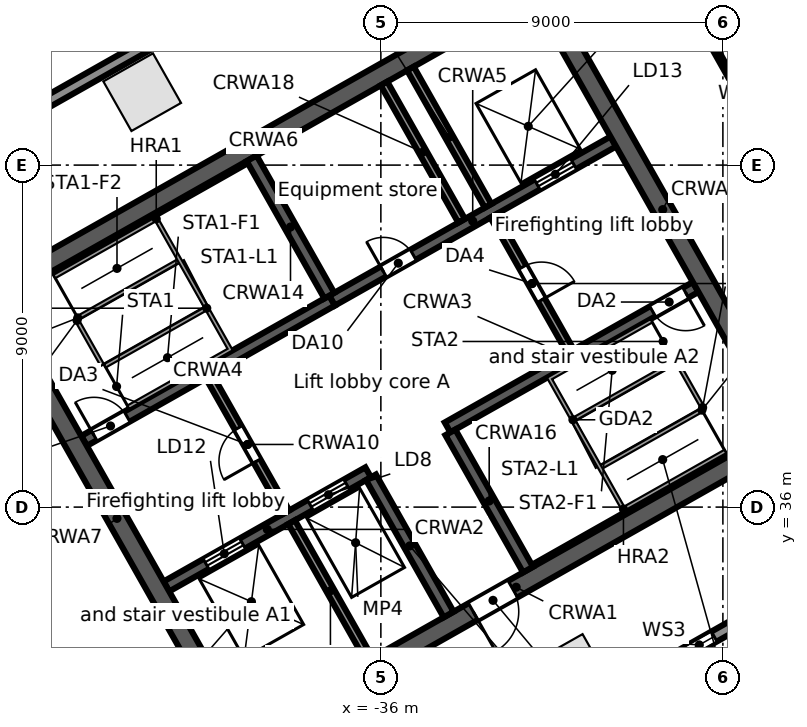
"""IFC4 building model, lengths in metres.
Left out: names, types, materials, properties, quantities, classifications, styles, units other than length and angle.
Written with IfcOpenShell. Run it as: python <this file> out.ifc"""

import sys

from ifc_helpers import new_model, si_unit, direction, frame, frame_2d, origin, origin_2d, place, context, subcontext, project, spatial, rectangle, extrude, element, fill, save


model = new_model("IFC4")
c1 = context("Model", 3, precision=1e-05, world=origin(), true_north=direction((0.0, 1.0)))
c2 = subcontext(c1, "Body", "Model", "MODEL_VIEW")
j1 = project(units=[si_unit("LENGTHUNIT", "METRE"), si_unit("PLANEANGLEUNIT", "RADIAN")], contexts=[c1])
p1 = place(None, origin())
s1 = spatial("IfcSite", under=j1, at=p1, CompositionType="ELEMENT")
p2 = place(p1, origin())
s2 = spatial("IfcBuilding", under=s1, at=p2, CompositionType="ELEMENT")
p3 = place(p2, frame((0.0, 0.0, 162.9)))
s3 = spatial("IfcBuildingStorey", under=s2, at=p3, CompositionType="ELEMENT", Elevation=162.9)
for number, where, z_axis, x_axis in (
    (1, (-42.28, 46.919, 0.0), (0.0, 0.0, 1.0), (-0.87, -0.492, 0.0)),
    (2, (-30.976, 31.635, 0.0), (0.0, 0.0, 1.0), (0.87, 0.492, 0.0)),
):
    element("IfcColumn", number, at=place(p3, frame(where, z_axis=z_axis, x_axis=x_axis)), inside=s3, PredefinedType="COLUMN", context=c2, shape_type="SweptSolid", body=[
        extrude(rectangle(XDim=1.5, YDim=1.5, at=origin_2d()), origin(), (0.0, 0.0, 1.0), 4.0),
    ])
p4 = place(p3, frame((-0.055, 47.969, 0.0), z_axis=(0.0, 0.0, 1.0), x_axis=(-0.870355730478, -0.492423499058, 0.0)))
e3 = element("IfcWall", 3, at=p4, inside=s3, PredefinedType="STANDARD", context=c2, shape_type="SweptSolid", body=[
    extrude(rectangle(XDim=43.75, YDim=0.3, at=frame_2d((21.875, 0.0))), origin(), (0.0, 0.0, 1.0), 3.68),
])
p5 = place(p4, frame((39.977, 0.0, 0.6)))
e4 = element("IfcOpeningElement", 4, at=p5, cuts=e3, PredefinedType="OPENING", context=c2, shape_type="SweptSolid", body=[
    extrude(rectangle(XDim=0.9, YDim=2.4, at=frame_2d((0.45, 1.2))), frame((0.0, 0.16, 0.0), z_axis=(0.0, -1.0, 0.0), x_axis=(1.0, 0.0, 0.0)), (0.0, 0.0, 1.0), 0.32),
])
p6 = place(p4, frame((37.338, 0.0, 0.0)))
e5 = element("IfcOpeningElement", 5, at=p6, cuts=e3, PredefinedType="OPENING", context=c2, shape_type="SweptSolid", body=[
    extrude(rectangle(XDim=1.8, YDim=2.4, at=frame_2d((0.9, 1.2))), frame((0.0, 0.16, 0.0), z_axis=(0.0, -1.0, 0.0), x_axis=(1.0, 0.0, 0.0)), (0.0, 0.0, 1.0), 0.32),
])
p7 = place(p4, frame((31.222, 0.0, 0.6)))
e6 = element("IfcOpeningElement", 6, at=p7, cuts=e3, PredefinedType="OPENING", context=c2, shape_type="SweptSolid", body=[
    extrude(rectangle(XDim=0.9, YDim=2.4, at=frame_2d((0.45, 1.2))), frame((0.0, 0.16, 0.0), z_axis=(0.0, -1.0, 0.0), x_axis=(1.0, 0.0, 0.0)), (0.0, 0.0, 1.0), 0.32),
])
p8 = place(p4, frame((28.584, 0.0, 0.0)))
e7 = element("IfcOpeningElement", 7, at=p8, cuts=e3, PredefinedType="OPENING", context=c2, shape_type="SweptSolid", body=[
    extrude(rectangle(XDim=1.8, YDim=2.4, at=frame_2d((0.9, 1.2))), frame((0.0, 0.16, 0.0), z_axis=(0.0, -1.0, 0.0), x_axis=(1.0, 0.0, 0.0)), (0.0, 0.0, 1.0), 0.32),
])
p9 = place(p4, frame((22.468, 0.0, 0.6)))
e8 = element("IfcOpeningElement", 8, at=p9, cuts=e3, PredefinedType="OPENING", context=c2, shape_type="SweptSolid", body=[
    extrude(rectangle(XDim=0.9, YDim=2.4, at=frame_2d((0.45, 1.2))), frame((0.0, 0.16, 0.0), z_axis=(0.0, -1.0, 0.0), x_axis=(1.0, 0.0, 0.0)), (0.0, 0.0, 1.0), 0.32),
])
p10 = place(p4, frame((19.829, 0.0, 0.0)))
e9 = element("IfcOpeningElement", 9, at=p10, cuts=e3, PredefinedType="OPENING", context=c2, shape_type="SweptSolid", body=[
    extrude(rectangle(XDim=1.8, YDim=2.4, at=frame_2d((0.9, 1.2))), frame((0.0, 0.16, 0.0), z_axis=(0.0, -1.0, 0.0), x_axis=(1.0, 0.0, 0.0)), (0.0, 0.0, 1.0), 0.32),
])
p11 = place(p4, frame((13.713, 0.0, 0.6)))
e10 = element("IfcOpeningElement", 10, at=p11, cuts=e3, PredefinedType="OPENING", context=c2, shape_type="SweptSolid", body=[
    extrude(rectangle(XDim=0.9, YDim=2.4, at=frame_2d((0.45, 1.2))), frame((0.0, 0.16, 0.0), z_axis=(0.0, -1.0, 0.0), x_axis=(1.0, 0.0, 0.0)), (0.0, 0.0, 1.0), 0.32),
])
p12 = place(p4, frame((11.075, 0.0, 0.0)))
e11 = element("IfcOpeningElement", 11, at=p12, cuts=e3, PredefinedType="OPENING", context=c2, shape_type="SweptSolid", body=[
    extrude(rectangle(XDim=1.8, YDim=2.4, at=frame_2d((0.9, 1.2))), frame((0.0, 0.16, 0.0), z_axis=(0.0, -1.0, 0.0), x_axis=(1.0, 0.0, 0.0)), (0.0, 0.0, 1.0), 0.32),
])
p13 = place(p4, frame((4.959, 0.0, 0.6)))
e12 = element("IfcOpeningElement", 12, at=p13, cuts=e3, PredefinedType="OPENING", context=c2, shape_type="SweptSolid", body=[
    extrude(rectangle(XDim=0.9, YDim=2.4, at=frame_2d((0.45, 1.2))), frame((0.0, 0.16, 0.0), z_axis=(0.0, -1.0, 0.0), x_axis=(1.0, 0.0, 0.0)), (0.0, 0.0, 1.0), 0.32),
])
p14 = place(p4, frame((2.32, 0.0, 0.0)))
e13 = element("IfcOpeningElement", 13, at=p14, cuts=e3, PredefinedType="OPENING", context=c2, shape_type="SweptSolid", body=[
    extrude(rectangle(XDim=1.8, YDim=2.4, at=frame_2d((0.9, 1.2))), frame((0.0, 0.16, 0.0), z_axis=(0.0, -1.0, 0.0), x_axis=(1.0, 0.0, 0.0)), (0.0, 0.0, 1.0), 0.32),
])
p15 = place(p3, frame((-58.745, 38.764, 0.0), z_axis=(0.0, 0.0, 1.0), x_axis=(0.870355811726, 0.492423355453, 0.0)))
e14 = element("IfcWall", 14, at=p15, inside=s3, PredefinedType="STANDARD", context=c2, shape_type="SweptSolid", body=[
    extrude(rectangle(XDim=64.025, YDim=0.3, at=frame_2d((32.013, 0.0))), origin(), (0.0, 0.0, 1.0), 3.68),
])
p16 = place(p15, frame((60.122, 0.0, 0.6)))
e15 = element("IfcOpeningElement", 15, at=p16, cuts=e14, PredefinedType="OPENING", context=c2, shape_type="SweptSolid", body=[
    extrude(rectangle(XDim=0.9, YDim=2.4, at=frame_2d((0.45, 1.2))), frame((0.0, 0.16, 0.0), z_axis=(0.0, -1.0, 0.0), x_axis=(1.0, 0.0, 0.0)), (0.0, 0.0, 1.0), 0.32),
])
p17 = place(p15, frame((50.992, 0.0, 0.6)))
e16 = element("IfcOpeningElement", 16, at=p17, cuts=e14, PredefinedType="OPENING", context=c2, shape_type="SweptSolid", body=[
    extrude(rectangle(XDim=0.9, YDim=2.4, at=frame_2d((0.45, 1.2))), frame((0.0, 0.16, 0.0), z_axis=(0.0, -1.0, 0.0), x_axis=(1.0, 0.0, 0.0)), (0.0, 0.0, 1.0), 0.32),
])
p18 = place(p15, frame((41.862, 0.0, 0.6)))
e17 = element("IfcOpeningElement", 17, at=p18, cuts=e14, PredefinedType="OPENING", context=c2, shape_type="SweptSolid", body=[
    extrude(rectangle(XDim=0.9, YDim=2.4, at=frame_2d((0.45, 1.2))), frame((0.0, 0.16, 0.0), z_axis=(0.0, -1.0, 0.0), x_axis=(1.0, 0.0, 0.0)), (0.0, 0.0, 1.0), 0.32),
])
p19 = place(p15, frame((32.732, 0.0, 0.6)))
e18 = element("IfcOpeningElement", 18, at=p19, cuts=e14, PredefinedType="OPENING", context=c2, shape_type="SweptSolid", body=[
    extrude(rectangle(XDim=0.9, YDim=2.4, at=frame_2d((0.45, 1.2))), frame((0.0, 0.16, 0.0), z_axis=(0.0, -1.0, 0.0), x_axis=(1.0, 0.0, 0.0)), (0.0, 0.0, 1.0), 0.32),
])
p20 = place(p15, frame((23.602, 0.0, 0.6)))
e19 = element("IfcOpeningElement", 19, at=p20, cuts=e14, PredefinedType="OPENING", context=c2, shape_type="SweptSolid", body=[
    extrude(rectangle(XDim=0.9, YDim=2.4, at=frame_2d((0.45, 1.2))), frame((0.0, 0.16, 0.0), z_axis=(0.0, -1.0, 0.0), x_axis=(1.0, 0.0, 0.0)), (0.0, 0.0, 1.0), 0.32),
])
p21 = place(p15, frame((14.472, 0.0, 0.6)))
e20 = element("IfcOpeningElement", 20, at=p21, cuts=e14, PredefinedType="OPENING", context=c2, shape_type="SweptSolid", body=[
    extrude(rectangle(XDim=0.9, YDim=2.4, at=frame_2d((0.45, 1.2))), frame((0.0, 0.16, 0.0), z_axis=(0.0, -1.0, 0.0), x_axis=(1.0, 0.0, 0.0)), (0.0, 0.0, 1.0), 0.32),
])
p22 = place(p15, frame((5.342, 0.0, 0.6)))
e21 = element("IfcOpeningElement", 21, at=p22, cuts=e14, PredefinedType="OPENING", context=c2, shape_type="SweptSolid", body=[
    extrude(rectangle(XDim=0.9, YDim=2.4, at=frame_2d((0.45, 1.2))), frame((0.0, 0.16, 0.0), z_axis=(0.0, -1.0, 0.0), x_axis=(1.0, 0.0, 0.0)), (0.0, 0.0, 1.0), 0.32),
])
p23 = place(p3, frame((-44.109, 26.504, 0.0), z_axis=(0.0, 0.0, 1.0), x_axis=(-0.857169502585, 0.515034410344, 0.0)))
e22 = element("IfcWall", 22, at=p23, inside=s3, PredefinedType="STANDARD", context=c2, shape_type="SweptSolid", body=[
    extrude(rectangle(XDim=17.127, YDim=0.3, at=frame_2d((8.563, 0.0))), origin(), (0.0, 0.0, 1.0), 3.68),
])
p24 = place(p23, frame((13.403, 0.0, 0.6)))
e23 = element("IfcOpeningElement", 23, at=p24, cuts=e22, PredefinedType="OPENING", context=c2, shape_type="SweptSolid", body=[
    extrude(rectangle(XDim=0.9, YDim=2.4, at=frame_2d((0.45, 1.2))), frame((0.0, 0.16, 0.0), z_axis=(0.0, -1.0, 0.0), x_axis=(1.0, 0.0, 0.0)), (0.0, 0.0, 1.0), 0.32),
])
p25 = place(p23, frame((4.903, 0.0, 0.6)))
e24 = element("IfcOpeningElement", 24, at=p25, cuts=e22, PredefinedType="OPENING", context=c2, shape_type="SweptSolid", body=[
    extrude(rectangle(XDim=0.9, YDim=2.4, at=frame_2d((0.45, 1.2))), frame((0.0, 0.16, 0.0), z_axis=(0.0, -1.0, 0.0), x_axis=(1.0, 0.0, 0.0)), (0.0, 0.0, 1.0), 0.32),
])
p26 = place(p3, frame((-39.838, 29.705, 0.0), z_axis=(0.0, 0.0, 1.0), x_axis=(0.870350116061, 0.492433422375, 0.0)))
e25 = element("IfcWall", 25, at=p26, inside=s3, PredefinedType="SOLIDWALL", context=c2, shape_type="SweptSolid", body=[
    extrude(rectangle(XDim=17.0, YDim=0.5, at=frame_2d((8.5, 0.0))), origin(), (0.0, 0.0, 1.0), 3.68),
])
p27 = place(p26, frame((7.2, 0.0, 0.0)))
e26 = element("IfcOpeningElement", 26, at=p27, cuts=e25, PredefinedType="OPENING", context=c2, shape_type="SweptSolid", body=[
    extrude(rectangle(XDim=1.2, YDim=2.1, at=frame_2d((0.6, 1.05))), frame((0.0, 0.26, 0.0), z_axis=(0.0, -1.0, 0.0), x_axis=(1.0, 0.0, 0.0)), (0.0, 0.0, 1.0), 0.52),
])
p28 = place(p3, frame((-41.643, 33.912, 0.0), z_axis=(0.0, 0.0, 1.0), x_axis=(0.870343599782, 0.492444939378, 0.0)))
e27 = element("IfcWall", 27, at=p28, inside=s3, PredefinedType="SOLIDWALL", context=c2, shape_type="SweptSolid", body=[
    extrude(rectangle(XDim=6.1, YDim=0.3, at=frame_2d((3.05, 0.0))), origin(), (0.0, 0.0, 1.0), 3.68),
])
p29 = place(p28, frame((1.2, 0.0, 0.0)))
e28 = element("IfcOpeningElement", 28, at=p29, cuts=e27, PredefinedType="OPENING", context=c2, shape_type="SweptSolid", body=[
    extrude(rectangle(XDim=1.1, YDim=2.1, at=frame_2d((0.55, 1.05))), frame((0.0, 0.16, 0.0), z_axis=(0.0, -1.0, 0.0), x_axis=(1.0, 0.0, 0.0)), (0.0, 0.0, 1.0), 0.32),
])
p30 = place(p28, frame((4.35, 0.0, 0.0)))
e29 = element("IfcOpeningElement", 29, at=p30, cuts=e27, PredefinedType="OPENING", context=c2, shape_type="SweptSolid", body=[
    extrude(rectangle(XDim=1.1, YDim=2.1, at=frame_2d((0.55, 1.05))), frame((0.0, 0.16, 0.0), z_axis=(0.0, -1.0, 0.0), x_axis=(1.0, 0.0, 0.0)), (0.0, 0.0, 1.0), 0.32),
])
p31 = place(p3, frame((-34.245, 38.097, 0.0), z_axis=(0.0, 0.0, 1.0), x_axis=(0.870364520461, 0.492407962489, 0.0)))
e30 = element("IfcWall", 30, at=p31, inside=s3, PredefinedType="SOLIDWALL", context=c2, shape_type="SweptSolid", body=[
    extrude(rectangle(XDim=7.5, YDim=0.3, at=frame_2d((3.75, 0.0))), origin(), (0.0, 0.0, 1.0), 3.68),
])
p32 = place(p31, frame((6.2, 0.0, 0.0)))
e31 = element("IfcOpeningElement", 31, at=p32, cuts=e30, PredefinedType="OPENING", context=c2, shape_type="SweptSolid", body=[
    extrude(rectangle(XDim=1.0, YDim=2.1, at=frame_2d((0.5, 1.05))), frame((0.0, 0.16, 0.0), z_axis=(0.0, -1.0, 0.0), x_axis=(1.0, 0.0, 0.0)), (0.0, 0.0, 1.0), 0.32),
])
p33 = place(p3, frame((-43.81, 37.741, 0.0), z_axis=(0.0, 0.0, 1.0), x_axis=(0.870350569555, 0.492432620848, 0.0)))
e32 = element("IfcWall", 32, at=p33, inside=s3, PredefinedType="SOLIDWALL", context=c2, shape_type="SweptSolid", body=[
    extrude(rectangle(XDim=7.5, YDim=0.3, at=frame_2d((3.75, 0.0))), origin(), (0.0, 0.0, 1.0), 3.68),
])
p34 = place(p33, frame((0.3, 0.0, 0.0)))
e33 = element("IfcOpeningElement", 33, at=p34, cuts=e32, PredefinedType="OPENING", context=c2, shape_type="SweptSolid", body=[
    extrude(rectangle(XDim=1.0, YDim=2.1, at=frame_2d((0.5, 1.05))), frame((0.0, 0.16, 0.0), z_axis=(0.0, -1.0, 0.0), x_axis=(1.0, 0.0, 0.0)), (0.0, 0.0, 1.0), 0.32),
])
p35 = place(p3, frame((-37.282, 41.435, 0.0), z_axis=(0.0, 0.0, 1.0), x_axis=(0.870356271124, 0.492422543467, 0.0)))
e34 = element("IfcWall", 34, at=p35, inside=s3, PredefinedType="SOLIDWALL", context=c2, shape_type="SweptSolid", body=[
    extrude(rectangle(XDim=8.5, YDim=0.3, at=frame_2d((4.25, 0.0))), origin(), (0.0, 0.0, 1.0), 3.68),
])
p36 = place(p35, frame((6.2, 0.0, 0.0)))
e35 = element("IfcOpeningElement", 35, at=p36, cuts=e34, PredefinedType="OPENING", context=c2, shape_type="SweptSolid", body=[
    extrude(rectangle(XDim=1.1, YDim=2.1, at=frame_2d((0.55, 1.05))), frame((0.0, 0.16, 0.0), z_axis=(0.0, -1.0, 0.0), x_axis=(1.0, 0.0, 0.0)), (0.0, 0.0, 1.0), 0.32),
])
p37 = place(p35, frame((1.55, 0.0, 0.0)))
e36 = element("IfcOpeningElement", 36, at=p37, cuts=e34, PredefinedType="OPENING", context=c2, shape_type="SweptSolid", body=[
    extrude(rectangle(XDim=0.9, YDim=2.1, at=frame_2d((0.45, 1.05))), frame((0.0, 0.16, 0.0), z_axis=(0.0, -1.0, 0.0), x_axis=(1.0, 0.0, 0.0)), (0.0, 0.0, 1.0), 0.32),
])
p38 = place(p3, frame((-46.486, 41.455, 0.0), z_axis=(0.0, 0.0, 1.0), x_axis=(0.870353598469, 0.492427267353, 0.0)))
e37 = element("IfcWall", 37, at=p38, inside=s3, PredefinedType="SOLIDWALL", context=c2, shape_type="SweptSolid", body=[
    extrude(rectangle(XDim=17.0, YDim=0.5, at=frame_2d((8.5, 0.0))), origin(), (0.0, 0.0, 1.0), 3.68),
])
p39 = place(p3, frame((-46.145, 41.361, 0.0), z_axis=(0.0, 0.0, 1.0), x_axis=(0.492435316254, -0.870349044525, 0.0)))
e38 = element("IfcWall", 38, at=p39, inside=s3, PredefinedType="SOLIDWALL", context=c2, shape_type="SweptSolid", body=[
    extrude(rectangle(XDim=13.0, YDim=0.5, at=frame_2d((6.5, 0.0))), origin(), (0.0, 0.0, 1.0), 3.68),
])
p40 = place(p3, frame((-38.349, 35.603, 0.0), z_axis=(0.0, 0.0, 1.0), x_axis=(0.492396453737, -0.870371031427, 0.0)))
e39 = element("IfcWall", 39, at=p40, inside=s3, PredefinedType="SOLIDWALL", context=c2, shape_type="SweptSolid", body=[
    extrude(rectangle(XDim=4.15, YDim=0.2, at=frame_2d((2.075, 0.0))), origin(), (0.0, 0.0, 1.0), 3.68),
])
p41 = place(p3, frame((-40.516, 39.433, 0.0), z_axis=(0.0, 0.0, 1.0), x_axis=(0.492453559952, -0.87033872216, 0.0)))
e40 = element("IfcWall", 40, at=p41, inside=s3, PredefinedType="PARTITIONING", context=c2, shape_type="SweptSolid", body=[
    extrude(rectangle(XDim=4.1, YDim=0.2, at=frame_2d((2.05, 0.0))), origin(), (0.0, 0.0, 1.0), 3.68),
])
p42 = place(p41, frame((1.55, 0.0, 0.0)))
e41 = element("IfcOpeningElement", 41, at=p42, cuts=e40, PredefinedType="OPENING", context=c2, shape_type="SweptSolid", body=[
    extrude(rectangle(XDim=1.0, YDim=2.1, at=frame_2d((0.5, 1.05))), frame((0.0, 0.11, 0.0), z_axis=(0.0, -1.0, 0.0), x_axis=(1.0, 0.0, 0.0)), (0.0, 0.0, 1.0), 0.22),
])
for number, where, z_axis, x_axis in (
    (42, (-36.26, 36.785, 0.0), (0.0, 0.0, 1.0), (0.492, -0.87, 0.0)),
    (43, (-39.399, 45.177, 0.0), (0.0, 0.0, 1.0), (0.492, -0.87, 0.0)),
    (44, (-34.171, 37.967, 0.0), (0.0, 0.0, 1.0), (0.492, -0.87, 0.0)),
):
    element("IfcWall", number, at=place(p3, frame(where, z_axis=z_axis, x_axis=x_axis)), inside=s3, PredefinedType="SOLIDWALL", context=c2, shape_type="SweptSolid", body=[
        extrude(rectangle(XDim=4.15, YDim=0.3, at=frame_2d((2.075, 0.0))), origin(), (0.0, 0.0, 1.0), 3.68),
    ])
p43 = place(p3, frame((-35.918, 47.147, 0.0), z_axis=(0.0, 0.0, 1.0), x_axis=(0.492441017253, -0.870345818929, 0.0)))
e45 = element("IfcWall", 45, at=p43, inside=s3, PredefinedType="SOLIDWALL", context=c2, shape_type="SweptSolid", body=[
    extrude(rectangle(XDim=4.15, YDim=0.2, at=frame_2d((2.075, 0.0))), origin(), (0.0, 0.0, 1.0), 3.68),
])
p44 = place(p3, frame((-33.031, 43.667, 0.0), z_axis=(0.0, 0.0, 1.0), x_axis=(0.492408451753, -0.87036424366, 0.0)))
e46 = element("IfcWall", 46, at=p44, inside=s3, PredefinedType="PARTITIONING", context=c2, shape_type="SweptSolid", body=[
    extrude(rectangle(XDim=4.1, YDim=0.2, at=frame_2d((2.05, 0.0))), origin(), (0.0, 0.0, 1.0), 3.68),
])
p45 = place(p44, frame((1.55, 0.0, 0.0)))
e47 = element("IfcOpeningElement", 47, at=p45, cuts=e46, PredefinedType="OPENING", context=c2, shape_type="SweptSolid", body=[
    extrude(rectangle(XDim=1.0, YDim=2.1, at=frame_2d((0.5, 1.05))), frame((0.0, 0.11, 0.0), z_axis=(0.0, -1.0, 0.0), x_axis=(1.0, 0.0, 0.0)), (0.0, 0.0, 1.0), 0.22),
])
p46 = place(p3, frame((-35.222, 47.541, 0.0), z_axis=(0.0, 0.0, 1.0), x_axis=(0.492421666909, -0.870356767055, 0.0)))
e48 = element("IfcWall", 48, at=p46, inside=s3, PredefinedType="SOLIDWALL", context=c2, shape_type="SweptSolid", body=[
    extrude(rectangle(XDim=4.15, YDim=0.2, at=frame_2d((2.075, 0.0))), origin(), (0.0, 0.0, 1.0), 3.68),
])
p47 = place(p3, frame((-31.784, 49.486, 0.0), z_axis=(0.0, 0.0, 1.0), x_axis=(0.492435316254, -0.870349044525, 0.0)))
e49 = element("IfcWall", 49, at=p47, inside=s3, PredefinedType="SOLIDWALL", context=c2, shape_type="SweptSolid", body=[
    extrude(rectangle(XDim=13.0, YDim=0.5, at=frame_2d((6.5, 0.0))), origin(), (0.0, 0.0, 1.0), 3.68),
])
p48 = place(p3, frame((-30.785, 54.411, 0.0), z_axis=(0.0, 0.0, 1.0), x_axis=(0.490135904292, -0.871646026391, 0.0)))
e50 = element("IfcWall", 50, at=p48, inside=s3, PredefinedType="PARTITIONING", context=c2, shape_type="SweptSolid", body=[
    extrude(rectangle(XDim=17.295, YDim=0.125, at=frame_2d((8.647, 0.0))), origin(), (0.0, 0.0, 1.0), 2.852),
])
p49 = place(p7, origin())
e51 = element("IfcWindow", 51, at=p49, inside=s3, PartitioningType="SINGLE_PANEL", PredefinedType="WINDOW", context=c2, shape_type="SweptSolid", body=[
    extrude(rectangle(XDim=0.9, YDim=2.4, at=frame_2d((0.45, 1.2))), frame((0.0, 0.03, 0.0), z_axis=(0.0, -1.0, 0.0), x_axis=(1.0, 0.0, 0.0)), (0.0, 0.0, 1.0), 0.06),
])
fill(e6, e51)
p50 = place(p36, origin())
e52 = element("IfcDoor", 52, at=p50, inside=s3, OperationType="DOUBLE_DOOR_SLIDING", PredefinedType="DOOR", context=c2, shape_type="SweptSolid", body=[
    extrude(rectangle(XDim=1.1, YDim=2.1, at=frame_2d((0.55, 1.05))), frame((0.0, 0.025, 0.0), z_axis=(0.0, -1.0, 0.0), x_axis=(1.0, 0.0, 0.0)), (0.0, 0.0, 1.0), 0.05),
])
fill(e35, e52)
p51 = place(p29, origin())
e53 = element("IfcDoor", 53, at=p51, inside=s3, OperationType="DOUBLE_DOOR_SLIDING", PredefinedType="DOOR", context=c2, shape_type="SweptSolid", body=[
    extrude(rectangle(XDim=1.1, YDim=2.1, at=frame_2d((0.55, 1.05))), frame((0.0, 0.025, 0.0), z_axis=(0.0, -1.0, 0.0), x_axis=(1.0, 0.0, 0.0)), (0.0, 0.0, 1.0), 0.05),
])
fill(e28, e53)
p52 = place(p30, origin())
e54 = element("IfcDoor", 54, at=p52, inside=s3, OperationType="DOUBLE_DOOR_SLIDING", PredefinedType="DOOR", context=c2, shape_type="SweptSolid", body=[
    extrude(rectangle(XDim=1.1, YDim=2.1, at=frame_2d((0.55, 1.05))), frame((0.0, 0.025, 0.0), z_axis=(0.0, -1.0, 0.0), x_axis=(1.0, 0.0, 0.0)), (0.0, 0.0, 1.0), 0.05),
])
fill(e29, e54)
p53 = place(p34, origin())
e55 = element("IfcDoor", 55, at=p53, inside=s3, OperationType="SINGLE_SWING_LEFT", PredefinedType="DOOR", context=c2, shape_type="SweptSolid", body=[
    extrude(rectangle(XDim=1.0, YDim=2.1, at=frame_2d((0.5, 1.05))), frame((0.0, 0.025, 0.0), z_axis=(0.0, -1.0, 0.0), x_axis=(1.0, 0.0, 0.0)), (0.0, 0.0, 1.0), 0.05),
])
fill(e33, e55)
p54 = place(p32, frame((1.0, 0.0, 0.0), z_axis=(0.0, 0.0, 1.0), x_axis=(-1.0, 0.0, 0.0)))
e56 = element("IfcDoor", 56, at=p54, inside=s3, OperationType="SINGLE_SWING_LEFT", PredefinedType="DOOR", context=c2, shape_type="SweptSolid", body=[
    extrude(rectangle(XDim=1.0, YDim=2.1, at=frame_2d((0.5, 1.05))), frame((0.0, 0.025, 0.0), z_axis=(0.0, -1.0, 0.0), x_axis=(1.0, 0.0, 0.0)), (0.0, 0.0, 1.0), 0.05),
])
fill(e31, e56)
p55 = place(p42, frame((1.0, 0.0, 0.0), z_axis=(0.0, 0.0, 1.0), x_axis=(-1.0, 0.0, 0.0)))
e57 = element("IfcDoor", 57, at=p55, inside=s3, OperationType="SINGLE_SWING_LEFT", PredefinedType="DOOR", context=c2, shape_type="SweptSolid", body=[
    extrude(rectangle(XDim=1.0, YDim=2.1, at=frame_2d((0.5, 1.05))), frame((0.0, 0.025, 0.0), z_axis=(0.0, -1.0, 0.0), x_axis=(1.0, 0.0, 0.0)), (0.0, 0.0, 1.0), 0.05),
])
fill(e41, e57)
p56 = place(p45, origin())
e58 = element("IfcDoor", 58, at=p56, inside=s3, OperationType="SINGLE_SWING_RIGHT", PredefinedType="DOOR", context=c2, shape_type="SweptSolid", body=[
    extrude(rectangle(XDim=1.0, YDim=2.1, at=frame_2d((0.5, 1.05))), frame((0.0, 0.025, 0.0), z_axis=(0.0, -1.0, 0.0), x_axis=(1.0, 0.0, 0.0)), (0.0, 0.0, 1.0), 0.05),
])
fill(e47, e58)
p57 = place(p27, frame((1.2, 0.0, 0.0), z_axis=(0.0, 0.0, 1.0), x_axis=(-1.0, 0.0, 0.0)))
e59 = element("IfcDoor", 59, at=p57, inside=s3, OperationType="SINGLE_SWING_RIGHT", PredefinedType="DOOR", context=c2, shape_type="SweptSolid", body=[
    extrude(rectangle(XDim=1.2, YDim=2.1, at=frame_2d((0.6, 1.05))), frame((0.0, 0.025, 0.0), z_axis=(0.0, -1.0, 0.0), x_axis=(1.0, 0.0, 0.0)), (0.0, 0.0, 1.0), 0.05),
])
fill(e26, e59)
p58 = place(p37, origin())
e60 = element("IfcDoor", 60, at=p58, inside=s3, OperationType="SINGLE_SWING_LEFT", PredefinedType="DOOR", context=c2, shape_type="SweptSolid", body=[
    extrude(rectangle(XDim=0.9, YDim=2.1, at=frame_2d((0.45, 1.05))), frame((0.0, 0.025, 0.0), z_axis=(0.0, -1.0, 0.0), x_axis=(1.0, 0.0, 0.0)), (0.0, 0.0, 1.0), 0.05),
])
fill(e36, e60)
save(model, sys.argv[1])
